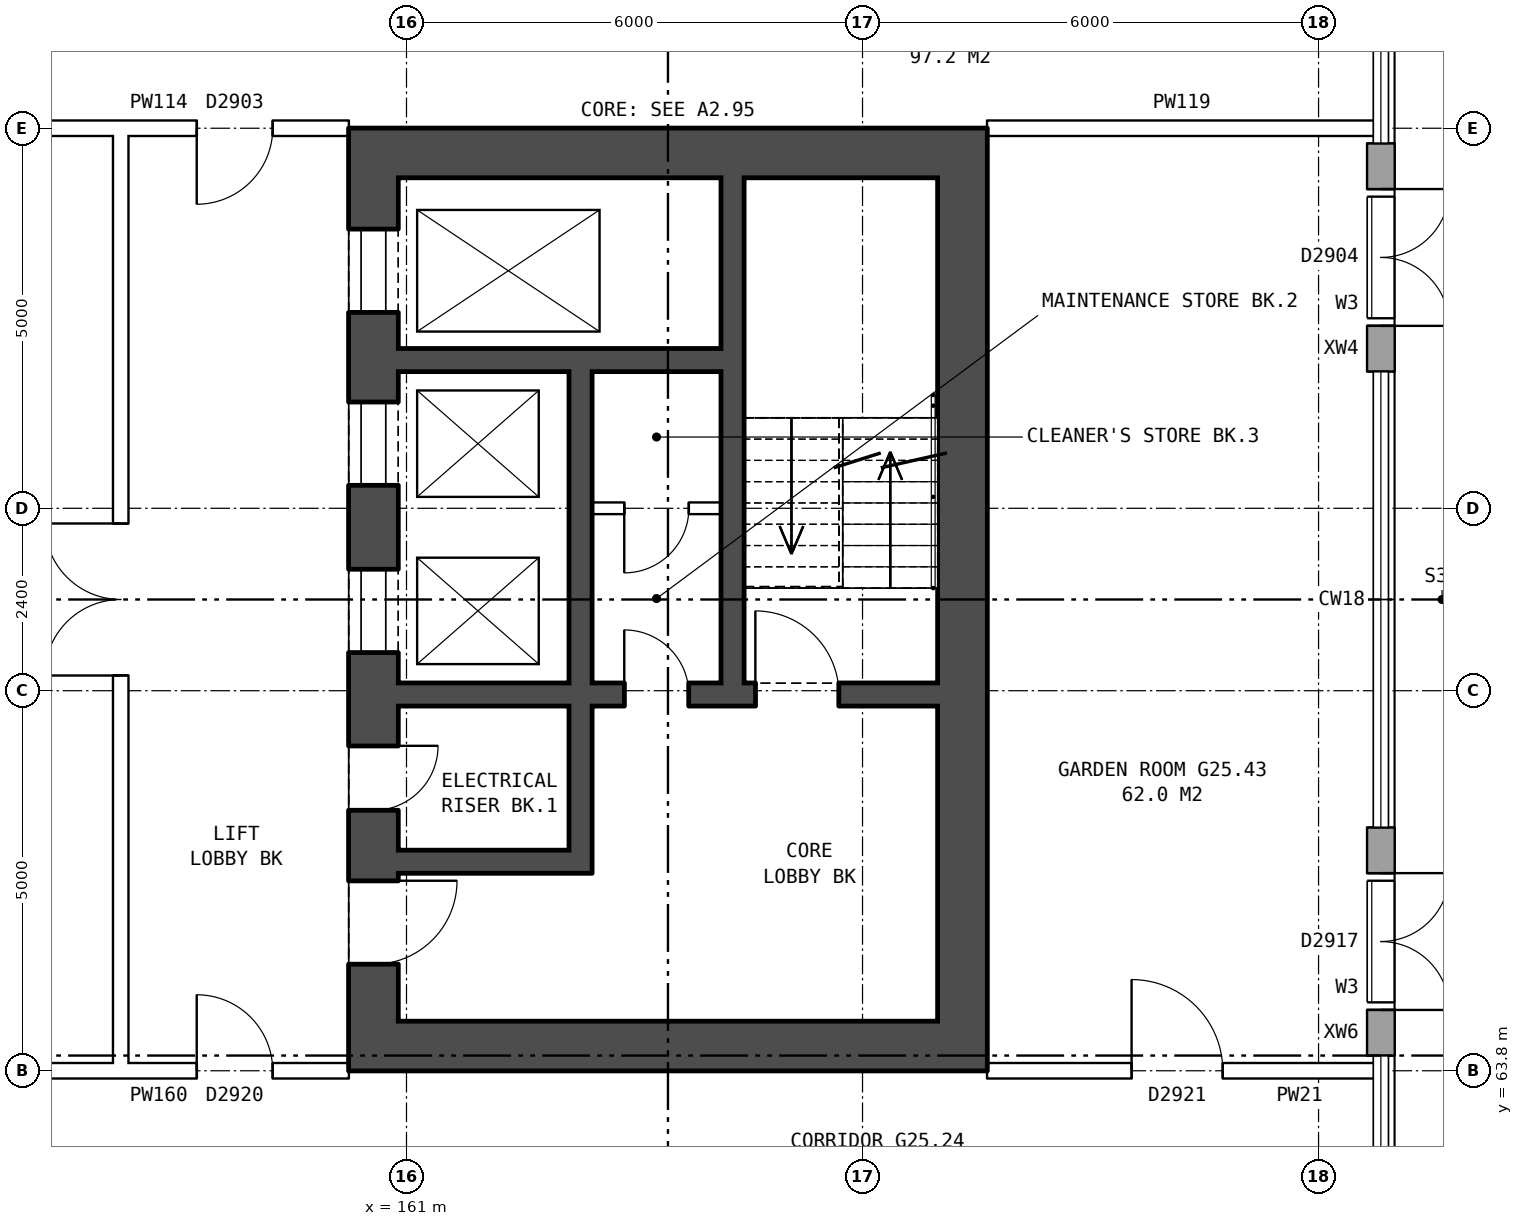
"""IFC4 building model, lengths in metres.
Left out: names, types, materials, properties, quantities, classifications, styles, units other than length and angle.
Written with IfcOpenShell. Run it as: python <this file> out.ifc"""

import sys

from ifc_helpers import new_model, si_unit, direction, frame, frame_2d, origin, place, context, subcontext, project, spatial, rectangle, extrude, element, fill, save


model = new_model("IFC4")
c1 = context("Model", 3, precision=1e-05, world=origin(), true_north=direction((0.0, 1.0)))
c2 = subcontext(c1, "Body", "Model", "MODEL_VIEW")
j1 = project(units=[si_unit("LENGTHUNIT", "METRE"), si_unit("PLANEANGLEUNIT", "RADIAN")], contexts=[c1])
p1 = place(None, origin())
s1 = spatial("IfcSite", under=j1, at=p1, CompositionType="ELEMENT")
p2 = place(p1, origin())
s2 = spatial("IfcBuilding", under=s1, at=p2, CompositionType="ELEMENT")
p3 = place(p2, frame((0.0, 0.0, 90.2)))
s3 = spatial("IfcBuildingStorey", under=s2, at=p3, CompositionType="ELEMENT", Elevation=90.2)
p4 = place(p3, frame((173.82, 64.0, 0.0), z_axis=(0.0, 0.0, 1.0), x_axis=(0.0, 1.0, 0.0)))
e1 = element("IfcWall", 1, at=p4, inside=s3, PredefinedType="STANDARD", context=c2, shape_type="SweptSolid", body=[
    extrude(rectangle(XDim=3.0, YDim=0.36, at=frame_2d((1.5, 0.0))), origin(), (0.0, 0.0, 1.0), 5.6),
])
p5 = place(p4, frame((0.7, 0.0, 3.4)))
e2 = element("IfcOpeningElement", 2, at=p5, cuts=e1, PredefinedType="OPENING", context=c2, shape_type="SweptSolid", body=[
    extrude(rectangle(XDim=1.6, YDim=1.2, at=frame_2d((0.8, 0.6))), frame((0.0, 0.19, 0.0), z_axis=(0.0, -1.0, 0.0), x_axis=(1.0, 0.0, 0.0)), (0.0, 0.0, 1.0), 0.38),
])
p6 = place(p4, frame((0.6, 0.0, 0.0)))
e3 = element("IfcOpeningElement", 3, at=p6, cuts=e1, PredefinedType="OPENING", context=c2, shape_type="SweptSolid", body=[
    extrude(rectangle(XDim=1.8, YDim=2.4, at=frame_2d((0.9, 1.2))), frame((0.0, 0.19, 0.0), z_axis=(0.0, -1.0, 0.0), x_axis=(1.0, 0.0, 0.0)), (0.0, 0.0, 1.0), 0.38),
])
p7 = place(p3, frame((173.82, 73.0, 0.0), z_axis=(0.0, 0.0, 1.0), x_axis=(0.0, 1.0, 0.0)))
e4 = element("IfcWall", 4, at=p7, inside=s3, PredefinedType="STANDARD", context=c2, shape_type="SweptSolid", body=[
    extrude(rectangle(XDim=3.0, YDim=0.36, at=frame_2d((1.5, 0.0))), origin(), (0.0, 0.0, 1.0), 5.6),
])
p8 = place(p7, frame((0.7, 0.0, 3.4)))
e5 = element("IfcOpeningElement", 5, at=p8, cuts=e4, PredefinedType="OPENING", context=c2, shape_type="SweptSolid", body=[
    extrude(rectangle(XDim=1.6, YDim=1.2, at=frame_2d((0.8, 0.6))), frame((0.0, 0.19, 0.0), z_axis=(0.0, -1.0, 0.0), x_axis=(1.0, 0.0, 0.0)), (0.0, 0.0, 1.0), 0.38),
])
p9 = place(p7, frame((0.6, 0.0, 0.0)))
e6 = element("IfcOpeningElement", 6, at=p9, cuts=e4, PredefinedType="OPENING", context=c2, shape_type="SweptSolid", body=[
    extrude(rectangle(XDim=1.8, YDim=2.4, at=frame_2d((0.9, 1.2))), frame((0.0, 0.19, 0.0), z_axis=(0.0, -1.0, 0.0), x_axis=(1.0, 0.0, 0.0)), (0.0, 0.0, 1.0), 0.38),
])
p10 = place(p3, frame((160.565, 75.55, 0.0), z_axis=(0.0, 0.0, 1.0), x_axis=(0.0, -1.0, 0.0)))
e7 = element("IfcWall", 7, at=p10, inside=s3, PredefinedType="SHEAR", context=c2, shape_type="SweptSolid", body=[
    extrude(rectangle(XDim=11.1, YDim=0.65, at=frame_2d((5.55, 0.0))), origin(), (0.0, 0.0, 1.0), 5.6),
])
p11 = place(p10, frame((0.675, 0.0, 0.0)))
e8 = element("IfcOpeningElement", 8, at=p11, cuts=e7, PredefinedType="OPENING", context=c2, shape_type="SweptSolid", body=[
    extrude(rectangle(XDim=1.1, YDim=2.1, at=frame_2d((0.55, 1.05))), frame((0.0, 0.335, 0.0), z_axis=(0.0, -1.0, 0.0), x_axis=(1.0, 0.0, 0.0)), (0.0, 0.0, 1.0), 0.67),
])
p12 = place(p10, frame((2.95, 0.0, 0.0)))
e9 = element("IfcOpeningElement", 9, at=p12, cuts=e7, PredefinedType="OPENING", context=c2, shape_type="SweptSolid", body=[
    extrude(rectangle(XDim=1.1, YDim=2.1, at=frame_2d((0.55, 1.05))), frame((0.0, 0.335, 0.0), z_axis=(0.0, -1.0, 0.0), x_axis=(1.0, 0.0, 0.0)), (0.0, 0.0, 1.0), 0.67),
])
p13 = place(p10, frame((5.15, 0.0, 0.0)))
e10 = element("IfcOpeningElement", 10, at=p13, cuts=e7, PredefinedType="OPENING", context=c2, shape_type="SweptSolid", body=[
    extrude(rectangle(XDim=1.1, YDim=2.1, at=frame_2d((0.55, 1.05))), frame((0.0, 0.335, 0.0), z_axis=(0.0, -1.0, 0.0), x_axis=(1.0, 0.0, 0.0)), (0.0, 0.0, 1.0), 0.67),
])
p14 = place(p10, frame((9.25, 0.0, 0.0)))
e11 = element("IfcOpeningElement", 11, at=p14, cuts=e7, PredefinedType="OPENING", context=c2, shape_type="SweptSolid", body=[
    extrude(rectangle(XDim=1.1, YDim=2.1, at=frame_2d((0.55, 1.05))), frame((0.0, 0.335, 0.0), z_axis=(0.0, -1.0, 0.0), x_axis=(1.0, 0.0, 0.0)), (0.0, 0.0, 1.0), 0.67),
])
p15 = place(p10, frame((7.475, 0.0, 0.0)))
e12 = element("IfcOpeningElement", 12, at=p15, cuts=e7, PredefinedType="OPENING", context=c2, shape_type="SweptSolid", body=[
    extrude(rectangle(XDim=0.85, YDim=2.1, at=frame_2d((0.425, 1.05))), frame((0.0, 0.335, 0.0), z_axis=(0.0, -1.0, 0.0), x_axis=(1.0, 0.0, 0.0)), (0.0, 0.0, 1.0), 0.67),
])
p16 = place(p3, frame((168.315, 75.55, 0.0), z_axis=(0.0, 0.0, 1.0), x_axis=(0.0, -1.0, 0.0)))
e13 = element("IfcWall", 13, at=p16, inside=s3, PredefinedType="SHEAR", context=c2, shape_type="SweptSolid", body=[
    extrude(rectangle(XDim=11.1, YDim=0.65, at=frame_2d((5.55, 0.0))), origin(), (0.0, 0.0, 1.0), 5.6),
])
for number, where, z_axis, x_axis in (
    (14, (160.24, 75.875, 0.0), (0.0, 0.0, 1.0), (1.0, 0.0, 0.0)),
    (15, (160.24, 64.125, 0.0), (0.0, 0.0, 1.0), (1.0, 0.0, 0.0)),
):
    element("IfcWall", number, at=place(p3, frame(where, z_axis=z_axis, x_axis=x_axis)), inside=s3, PredefinedType="SHEAR", context=c2, shape_type="SweptSolid", body=[
        extrude(rectangle(XDim=8.4, YDim=0.65, at=frame_2d((4.2, 0.0))), origin(), (0.0, 0.0, 1.0), 5.6),
    ])
p17 = place(p3, frame((160.89, 73.15, 0.0), z_axis=(0.0, 0.0, 1.0), x_axis=(1.0, 0.0, 0.0)))
e16 = element("IfcWall", 16, at=p17, inside=s3, PredefinedType="SHEAR", context=c2, shape_type="SweptSolid", body=[
    extrude(rectangle(XDim=4.25, YDim=0.3, at=frame_2d((2.125, 0.0))), origin(), (0.0, 0.0, 1.0), 5.6),
])
p18 = place(p3, frame((163.44, 71.2, 0.0), z_axis=(0.0, 0.0, 1.0), x_axis=(1.0, 0.0, 0.0)))
e17 = element("IfcWall", 17, at=p18, inside=s3, PredefinedType="PARTITIONING", context=c2, shape_type="SweptSolid", body=[
    extrude(rectangle(XDim=1.7, YDim=0.15, at=frame_2d((0.85, 0.0))), origin(), (0.0, 0.0, 1.0), 5.6),
])
p19 = place(p18, frame((0.425, 0.0, 0.0)))
e18 = element("IfcOpeningElement", 18, at=p19, cuts=e17, PredefinedType="OPENING", context=c2, shape_type="SweptSolid", body=[
    extrude(rectangle(XDim=0.85, YDim=2.1, at=frame_2d((0.425, 1.05))), frame((0.0, 0.085, 0.0), z_axis=(0.0, -1.0, 0.0), x_axis=(1.0, 0.0, 0.0)), (0.0, 0.0, 1.0), 0.17),
])
p20 = place(p3, frame((160.89, 68.75, 0.0), z_axis=(0.0, 0.0, 1.0), x_axis=(1.0, 0.0, 0.0)))
e19 = element("IfcWall", 19, at=p20, inside=s3, PredefinedType="SHEAR", context=c2, shape_type="SweptSolid", body=[
    extrude(rectangle(XDim=7.1, YDim=0.3, at=frame_2d((3.55, 0.0))), origin(), (0.0, 0.0, 1.0), 5.6),
])
p21 = place(p20, frame((4.7, 0.0, 0.0)))
e20 = element("IfcOpeningElement", 20, at=p21, cuts=e19, PredefinedType="OPENING", context=c2, shape_type="SweptSolid", body=[
    extrude(rectangle(XDim=1.1, YDim=2.1, at=frame_2d((0.55, 1.05))), frame((0.0, 0.16, 0.0), z_axis=(0.0, -1.0, 0.0), x_axis=(1.0, 0.0, 0.0)), (0.0, 0.0, 1.0), 0.32),
])
p22 = place(p20, frame((2.975, 0.0, 0.0)))
e21 = element("IfcOpeningElement", 21, at=p22, cuts=e19, PredefinedType="OPENING", context=c2, shape_type="SweptSolid", body=[
    extrude(rectangle(XDim=0.85, YDim=2.1, at=frame_2d((0.425, 1.05))), frame((0.0, 0.16, 0.0), z_axis=(0.0, -1.0, 0.0), x_axis=(1.0, 0.0, 0.0)), (0.0, 0.0, 1.0), 0.32),
])
p23 = place(p3, frame((160.89, 66.55, 0.0), z_axis=(0.0, 0.0, 1.0), x_axis=(1.0, 0.0, 0.0)))
e22 = element("IfcWall", 22, at=p23, inside=s3, PredefinedType="SHEAR", context=c2, shape_type="SweptSolid", body=[
    extrude(rectangle(XDim=2.25, YDim=0.3, at=frame_2d((1.125, 0.0))), origin(), (0.0, 0.0, 1.0), 5.6),
])
p24 = place(p3, frame((163.29, 73.0, 0.0), z_axis=(0.0, 0.0, 1.0), x_axis=(0.0, -1.0, 0.0)))
e23 = element("IfcWall", 23, at=p24, inside=s3, PredefinedType="SHEAR", context=c2, shape_type="SweptSolid", body=[
    extrude(rectangle(XDim=4.1, YDim=0.3, at=frame_2d((2.05, 0.0))), origin(), (0.0, 0.0, 1.0), 5.6),
])
p25 = place(p3, frame((163.29, 68.6, 0.0), z_axis=(0.0, 0.0, 1.0), x_axis=(0.0, -1.0, 0.0)))
e24 = element("IfcWall", 24, at=p25, inside=s3, PredefinedType="SHEAR", context=c2, shape_type="SweptSolid", body=[
    extrude(rectangle(XDim=2.2, YDim=0.3, at=frame_2d((1.1, 0.0))), origin(), (0.0, 0.0, 1.0), 5.6),
])
p26 = place(p3, frame((165.29, 75.55, 0.0), z_axis=(0.0, 0.0, 1.0), x_axis=(0.0, -1.0, 0.0)))
e25 = element("IfcWall", 25, at=p26, inside=s3, PredefinedType="SHEAR", context=c2, shape_type="SweptSolid", body=[
    extrude(rectangle(XDim=6.65, YDim=0.3, at=frame_2d((3.325, 0.0))), origin(), (0.0, 0.0, 1.0), 5.6),
])
p27 = place(p3, frame((157.24, 63.9, 0.0), z_axis=(0.0, 0.0, 1.0), x_axis=(0.0, 1.0, 0.0)))
e26 = element("IfcWall", 26, at=p27, inside=s3, PredefinedType="PARTITIONING", context=c2, shape_type="SweptSolid", body=[
    extrude(rectangle(XDim=12.2, YDim=0.2, at=frame_2d((6.1, 0.0))), origin(), (0.0, 0.0, 1.0), 5.6),
])
p28 = place(p27, frame((5.1, 0.0, 0.0)))
e27 = element("IfcOpeningElement", 27, at=p28, cuts=e26, PredefinedType="OPENING", context=c2, shape_type="SweptSolid", body=[
    extrude(rectangle(XDim=2.0, YDim=2.1, at=frame_2d((1.0, 1.05))), frame((0.0, 0.11, 0.0), z_axis=(0.0, -1.0, 0.0), x_axis=(1.0, 0.0, 0.0)), (0.0, 0.0, 1.0), 0.22),
])
p29 = place(p3, frame((142.76, 63.8, 0.0), z_axis=(0.0, 0.0, 1.0), x_axis=(1.0, 0.0, 0.0)))
e28 = element("IfcWall", 28, at=p29, inside=s3, PredefinedType="PARTITIONING", context=c2, shape_type="SweptSolid", body=[
    extrude(rectangle(XDim=14.48, YDim=0.2, at=frame_2d((7.24, 0.0))), origin(), (0.0, 0.0, 1.0), 5.6),
])
p30 = place(p29, frame((6.34, 0.0, 0.0)))
e29 = element("IfcOpeningElement", 29, at=p30, cuts=e28, PredefinedType="OPENING", context=c2, shape_type="SweptSolid", body=[
    extrude(rectangle(XDim=1.8, YDim=2.1, at=frame_2d((0.9, 1.05))), frame((0.0, 0.11, 0.0), z_axis=(0.0, -1.0, 0.0), x_axis=(1.0, 0.0, 0.0)), (0.0, 0.0, 1.0), 0.22),
])
p31 = place(p3, frame((168.64, 63.8, 0.0), z_axis=(0.0, 0.0, 1.0), x_axis=(1.0, 0.0, 0.0)))
e30 = element("IfcWall", 30, at=p31, inside=s3, PredefinedType="PARTITIONING", context=c2, shape_type="SweptSolid", body=[
    extrude(rectangle(XDim=5.12, YDim=0.2, at=frame_2d((2.56, 0.0))), origin(), (0.0, 0.0, 1.0), 5.6),
])
p32 = place(p31, frame((1.9, 0.0, 0.0)))
e31 = element("IfcOpeningElement", 31, at=p32, cuts=e30, PredefinedType="OPENING", context=c2, shape_type="SweptSolid", body=[
    extrude(rectangle(XDim=1.2, YDim=2.1, at=frame_2d((0.6, 1.05))), frame((0.0, 0.11, 0.0), z_axis=(0.0, -1.0, 0.0), x_axis=(1.0, 0.0, 0.0)), (0.0, 0.0, 1.0), 0.22),
])
p33 = place(p3, frame((157.24, 63.8, 0.0), z_axis=(0.0, 0.0, 1.0), x_axis=(1.0, 0.0, 0.0)))
e32 = element("IfcWall", 32, at=p33, inside=s3, PredefinedType="PARTITIONING", context=c2, shape_type="SweptSolid", body=[
    extrude(rectangle(XDim=3.0, YDim=0.2, at=frame_2d((1.5, 0.0))), origin(), (0.0, 0.0, 1.0), 5.6),
])
p34 = place(p33, frame((1.0, 0.0, 0.0)))
e33 = element("IfcOpeningElement", 33, at=p34, cuts=e32, PredefinedType="OPENING", context=c2, shape_type="SweptSolid", body=[
    extrude(rectangle(XDim=1.0, YDim=2.1, at=frame_2d((0.5, 1.05))), frame((0.0, 0.11, 0.0), z_axis=(0.0, -1.0, 0.0), x_axis=(1.0, 0.0, 0.0)), (0.0, 0.0, 1.0), 0.22),
])
p35 = place(p3, frame((142.76, 76.2, 0.0), z_axis=(0.0, 0.0, 1.0), x_axis=(1.0, 0.0, 0.0)))
e34 = element("IfcWall", 34, at=p35, inside=s3, PredefinedType="PARTITIONING", context=c2, shape_type="SweptSolid", body=[
    extrude(rectangle(XDim=14.48, YDim=0.2, at=frame_2d((7.24, 0.0))), origin(), (0.0, 0.0, 1.0), 5.6),
])
p36 = place(p35, frame((6.34, 0.0, 0.0)))
e35 = element("IfcOpeningElement", 35, at=p36, cuts=e34, PredefinedType="OPENING", context=c2, shape_type="SweptSolid", body=[
    extrude(rectangle(XDim=1.8, YDim=2.1, at=frame_2d((0.9, 1.05))), frame((0.0, 0.11, 0.0), z_axis=(0.0, -1.0, 0.0), x_axis=(1.0, 0.0, 0.0)), (0.0, 0.0, 1.0), 0.22),
])
p37 = place(p3, frame((168.64, 76.2, 0.0), z_axis=(0.0, 0.0, 1.0), x_axis=(1.0, 0.0, 0.0)))
e36 = element("IfcWall", 36, at=p37, inside=s3, PredefinedType="PARTITIONING", context=c2, shape_type="SweptSolid", body=[
    extrude(rectangle(XDim=5.12, YDim=0.2, at=frame_2d((2.56, 0.0))), origin(), (0.0, 0.0, 1.0), 5.6),
])
p38 = place(p3, frame((157.24, 76.2, 0.0), z_axis=(0.0, 0.0, 1.0), x_axis=(1.0, 0.0, 0.0)))
e37 = element("IfcWall", 37, at=p38, inside=s3, PredefinedType="PARTITIONING", context=c2, shape_type="SweptSolid", body=[
    extrude(rectangle(XDim=3.0, YDim=0.2, at=frame_2d((1.5, 0.0))), origin(), (0.0, 0.0, 1.0), 5.6),
])
p39 = place(p38, frame((1.0, 0.0, 0.0)))
e38 = element("IfcOpeningElement", 38, at=p39, cuts=e37, PredefinedType="OPENING", context=c2, shape_type="SweptSolid", body=[
    extrude(rectangle(XDim=1.0, YDim=2.1, at=frame_2d((0.5, 1.05))), frame((0.0, 0.11, 0.0), z_axis=(0.0, -1.0, 0.0), x_axis=(1.0, 0.0, 0.0)), (0.0, 0.0, 1.0), 0.22),
])
p40 = place(p5, origin())
e39 = element("IfcWindow", 39, at=p40, inside=s3, PartitioningType="DOUBLE_PANEL_HORIZONTAL", PredefinedType="WINDOW", context=c2, shape_type="SweptSolid", body=[
    extrude(rectangle(XDim=1.6, YDim=1.2, at=frame_2d((0.8, 0.6))), frame((0.0, 0.15, 0.0), z_axis=(0.0, -1.0, 0.0), x_axis=(1.0, 0.0, 0.0)), (0.0, 0.0, 1.0), 0.06),
])
fill(e2, e39)
p41 = place(p6, frame((1.8, 0.0, 0.0), z_axis=(0.0, 0.0, 1.0), x_axis=(-1.0, 0.0, 0.0)))
e40 = element("IfcDoor", 40, at=p41, inside=s3, OperationType="DOUBLE_DOOR_SINGLE_SWING", PredefinedType="DOOR", context=c2, shape_type="SweptSolid", body=[
    extrude(rectangle(XDim=1.8, YDim=2.4, at=frame_2d((0.9, 1.2))), frame((0.0, 0.025, 0.0), z_axis=(0.0, -1.0, 0.0), x_axis=(1.0, 0.0, 0.0)), (0.0, 0.0, 1.0), 0.05),
])
fill(e3, e40)
p42 = place(p8, origin())
e41 = element("IfcWindow", 41, at=p42, inside=s3, PartitioningType="DOUBLE_PANEL_HORIZONTAL", PredefinedType="WINDOW", context=c2, shape_type="SweptSolid", body=[
    extrude(rectangle(XDim=1.6, YDim=1.2, at=frame_2d((0.8, 0.6))), frame((0.0, 0.15, 0.0), z_axis=(0.0, -1.0, 0.0), x_axis=(1.0, 0.0, 0.0)), (0.0, 0.0, 1.0), 0.06),
])
fill(e5, e41)
p43 = place(p9, frame((1.8, 0.0, 0.0), z_axis=(0.0, 0.0, 1.0), x_axis=(-1.0, 0.0, 0.0)))
e42 = element("IfcDoor", 42, at=p43, inside=s3, OperationType="DOUBLE_DOOR_SINGLE_SWING", PredefinedType="DOOR", context=c2, shape_type="SweptSolid", body=[
    extrude(rectangle(XDim=1.8, YDim=2.4, at=frame_2d((0.9, 1.2))), frame((0.0, 0.025, 0.0), z_axis=(0.0, -1.0, 0.0), x_axis=(1.0, 0.0, 0.0)), (0.0, 0.0, 1.0), 0.05),
])
fill(e6, e42)
p44 = place(p11, origin())
e43 = element("IfcDoor", 43, at=p44, inside=s3, OperationType="DOUBLE_DOOR_SLIDING", PredefinedType="DOOR", context=c2, shape_type="SweptSolid", body=[
    extrude(rectangle(XDim=1.1, YDim=2.1, at=frame_2d((0.55, 1.05))), frame((0.0, 0.31, 0.0), z_axis=(0.0, -1.0, 0.0), x_axis=(1.0, 0.0, 0.0)), (0.0, 0.0, 1.0), 0.05),
])
fill(e8, e43)
p45 = place(p12, origin())
e44 = element("IfcDoor", 44, at=p45, inside=s3, OperationType="DOUBLE_DOOR_SLIDING", PredefinedType="DOOR", context=c2, shape_type="SweptSolid", body=[
    extrude(rectangle(XDim=1.1, YDim=2.1, at=frame_2d((0.55, 1.05))), frame((0.0, 0.31, 0.0), z_axis=(0.0, -1.0, 0.0), x_axis=(1.0, 0.0, 0.0)), (0.0, 0.0, 1.0), 0.05),
])
fill(e9, e44)
p46 = place(p13, origin())
e45 = element("IfcDoor", 45, at=p46, inside=s3, OperationType="DOUBLE_DOOR_SLIDING", PredefinedType="DOOR", context=c2, shape_type="SweptSolid", body=[
    extrude(rectangle(XDim=1.1, YDim=2.1, at=frame_2d((0.55, 1.05))), frame((0.0, 0.31, 0.0), z_axis=(0.0, -1.0, 0.0), x_axis=(1.0, 0.0, 0.0)), (0.0, 0.0, 1.0), 0.05),
])
fill(e10, e45)
p47 = place(p14, origin())
e46 = element("IfcDoor", 46, at=p47, inside=s3, OperationType="SINGLE_SWING_LEFT", PredefinedType="DOOR", context=c2, shape_type="SweptSolid", body=[
    extrude(rectangle(XDim=1.1, YDim=2.1, at=frame_2d((0.55, 1.05))), frame((0.0, 0.31, 0.0), z_axis=(0.0, -1.0, 0.0), x_axis=(1.0, 0.0, 0.0)), (0.0, 0.0, 1.0), 0.05),
])
fill(e11, e46)
p48 = place(p21, origin())
e47 = element("IfcDoor", 47, at=p48, inside=s3, OperationType="SINGLE_SWING_LEFT", PredefinedType="DOOR", context=c2, shape_type="SweptSolid", body=[
    extrude(rectangle(XDim=1.1, YDim=2.1, at=frame_2d((0.55, 1.05))), frame((0.0, 0.025, 0.0), z_axis=(0.0, -1.0, 0.0), x_axis=(1.0, 0.0, 0.0)), (0.0, 0.0, 1.0), 0.05),
])
fill(e20, e47)
p49 = place(p15, origin())
e48 = element("IfcDoor", 48, at=p49, inside=s3, OperationType="SINGLE_SWING_LEFT", PredefinedType="DOOR", context=c2, shape_type="SweptSolid", body=[
    extrude(rectangle(XDim=0.85, YDim=2.1, at=frame_2d((0.425, 1.05))), frame((0.0, 0.31, 0.0), z_axis=(0.0, -1.0, 0.0), x_axis=(1.0, 0.0, 0.0)), (0.0, 0.0, 1.0), 0.05),
])
fill(e12, e48)
p50 = place(p22, origin())
e49 = element("IfcDoor", 49, at=p50, inside=s3, OperationType="SINGLE_SWING_LEFT", PredefinedType="DOOR", context=c2, shape_type="SweptSolid", body=[
    extrude(rectangle(XDim=0.85, YDim=2.1, at=frame_2d((0.425, 1.05))), frame((0.0, 0.025, 0.0), z_axis=(0.0, -1.0, 0.0), x_axis=(1.0, 0.0, 0.0)), (0.0, 0.0, 1.0), 0.05),
])
fill(e21, e49)
p51 = place(p19, frame((0.85, 0.0, 0.0), z_axis=(0.0, 0.0, 1.0), x_axis=(-1.0, 0.0, 0.0)))
e50 = element("IfcDoor", 50, at=p51, inside=s3, OperationType="SINGLE_SWING_RIGHT", PredefinedType="DOOR", context=c2, shape_type="SweptSolid", body=[
    extrude(rectangle(XDim=0.85, YDim=2.1, at=frame_2d((0.425, 1.05))), frame((0.0, 0.025, 0.0), z_axis=(0.0, -1.0, 0.0), x_axis=(1.0, 0.0, 0.0)), (0.0, 0.0, 1.0), 0.05),
])
fill(e18, e50)
p52 = place(p28, origin())
e51 = element("IfcDoor", 51, at=p52, inside=s3, OperationType="DOUBLE_DOOR_SINGLE_SWING", PredefinedType="DOOR", context=c2, shape_type="SweptSolid", body=[
    extrude(rectangle(XDim=2.0, YDim=2.1, at=frame_2d((1.0, 1.05))), frame((0.0, 0.025, 0.0), z_axis=(0.0, -1.0, 0.0), x_axis=(1.0, 0.0, 0.0)), (0.0, 0.0, 1.0), 0.05),
])
fill(e27, e51)
p53 = place(p32, origin())
e52 = element("IfcDoor", 52, at=p53, inside=s3, OperationType="SINGLE_SWING_LEFT", PredefinedType="DOOR", context=c2, shape_type="SweptSolid", body=[
    extrude(rectangle(XDim=1.2, YDim=2.1, at=frame_2d((0.6, 1.05))), frame((0.0, 0.025, 0.0), z_axis=(0.0, -1.0, 0.0), x_axis=(1.0, 0.0, 0.0)), (0.0, 0.0, 1.0), 0.05),
])
fill(e31, e52)
p54 = place(p34, origin())
e53 = element("IfcDoor", 53, at=p54, inside=s3, OperationType="SINGLE_SWING_LEFT", PredefinedType="DOOR", context=c2, shape_type="SweptSolid", body=[
    extrude(rectangle(XDim=1.0, YDim=2.1, at=frame_2d((0.5, 1.05))), frame((0.0, 0.025, 0.0), z_axis=(0.0, -1.0, 0.0), x_axis=(1.0, 0.0, 0.0)), (0.0, 0.0, 1.0), 0.05),
])
fill(e33, e53)
p55 = place(p39, frame((1.0, 0.0, 0.0), z_axis=(0.0, 0.0, 1.0), x_axis=(-1.0, 0.0, 0.0)))
e54 = element("IfcDoor", 54, at=p55, inside=s3, OperationType="SINGLE_SWING_RIGHT", PredefinedType="DOOR", context=c2, shape_type="SweptSolid", body=[
    extrude(rectangle(XDim=1.0, YDim=2.1, at=frame_2d((0.5, 1.05))), frame((0.0, 0.025, 0.0), z_axis=(0.0, -1.0, 0.0), x_axis=(1.0, 0.0, 0.0)), (0.0, 0.0, 1.0), 0.05),
])
fill(e38, e54)
save(model, sys.argv[1])
